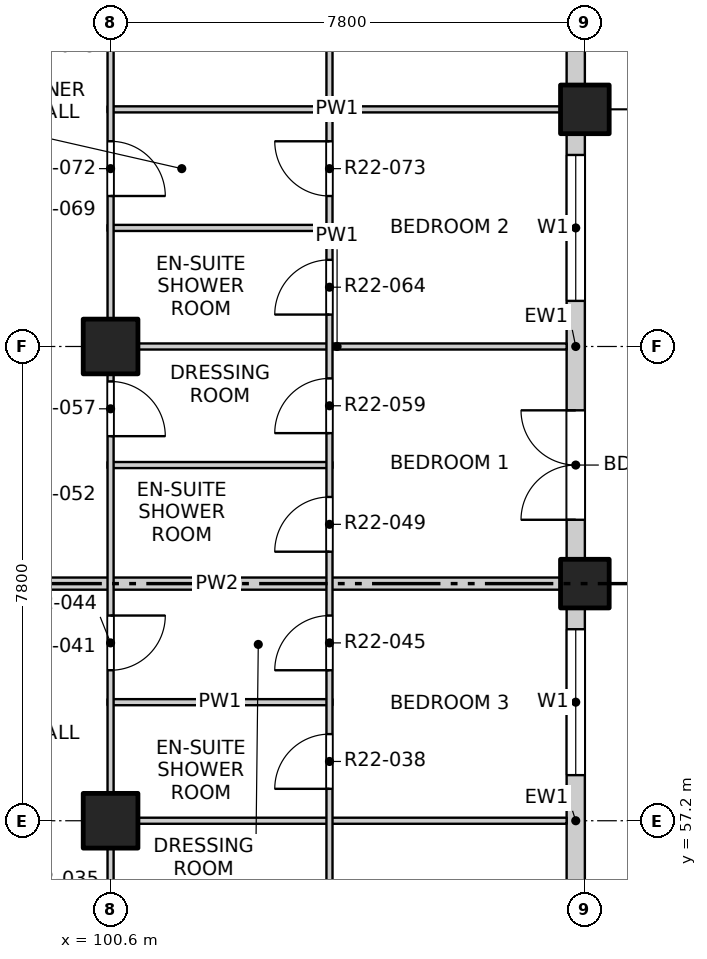
"""IFC4 building model, lengths in metres.
Left out: names, types, materials, properties, quantities, classifications, styles, units other than length and angle.
Written with IfcOpenShell. Run it as: python <this file> out.ifc"""

import sys

from ifc_helpers import new_model, si_unit, direction, frame, frame_2d, origin, origin_2d, place, context, subcontext, project, spatial, rectangle, extrude, element, fill, save


model = new_model("IFC4")
c1 = context("Model", 3, precision=1e-05, world=origin(), true_north=direction((0.0, 1.0)))
c2 = subcontext(c1, "Body", "Model", "MODEL_VIEW")
j1 = project(units=[si_unit("LENGTHUNIT", "METRE"), si_unit("PLANEANGLEUNIT", "RADIAN")], contexts=[c1])
p1 = place(None, origin())
s1 = spatial("IfcSite", under=j1, at=p1, CompositionType="ELEMENT")
p2 = place(p1, origin())
s2 = spatial("IfcBuilding", under=s1, at=p2, CompositionType="ELEMENT")
p3 = place(p2, frame((0.0, 0.0, 224.5)))
s3 = spatial("IfcBuildingStorey", under=s2, at=p3, CompositionType="ELEMENT", Elevation=224.5)
for number, where, z_axis, x_axis in (
    (1, (108.4, 61.1, -0.25), (0.0, 0.0, 1.0), (1.0, 0.0, 0.0)),
    (2, (108.4, 68.9, -0.25), (0.0, 0.0, 1.0), (1.0, 0.0, 0.0)),
):
    element("IfcColumn", number, at=place(p3, frame(where, z_axis=z_axis, x_axis=x_axis)), inside=s3, PredefinedType="COLUMN", context=c2, shape_type="SweptSolid", body=[
        extrude(rectangle(XDim=0.8, YDim=0.8, at=origin_2d()), origin(), (0.0, 0.0, 1.0), 3.4),
    ])
for number, where, z_axis, x_axis in (
    (3, (100.6, 57.2, -0.25), (0.0, 0.0, 1.0), (1.0, 0.0, 0.0)),
    (4, (100.6, 65.0, -0.25), (0.0, 0.0, 1.0), (1.0, 0.0, 0.0)),
):
    element("IfcColumn", number, at=place(p3, frame(where, z_axis=z_axis, x_axis=x_axis)), inside=s3, PredefinedType="COLUMN", context=c2, shape_type="SweptSolid", body=[
        extrude(rectangle(XDim=0.9, YDim=0.9, at=origin_2d()), origin(), (0.0, 0.0, 1.0), 3.4),
    ])
p4 = place(p3, frame((108.25, 53.7, 0.0), z_axis=(0.0, 0.0, 1.0), x_axis=(0.0, 1.0, 0.0)))
e5 = element("IfcWall", 5, at=p4, inside=s3, PredefinedType="SOLIDWALL", context=c2, shape_type="SweptSolid", body=[
    extrude(rectangle(XDim=7.0, YDim=0.3, at=frame_2d((3.5, 0.0))), origin(), (0.0, 0.0, 1.0), 2.7),
])
p5 = place(p4, frame((0.65, 0.0, 0.0)))
e6 = element("IfcOpeningElement", 6, at=p5, cuts=e5, PredefinedType="OPENING", context=c2, shape_type="SweptSolid", body=[
    extrude(rectangle(XDim=1.8, YDim=2.4, at=frame_2d((0.9, 1.2))), frame((0.0, 0.16, 0.0), z_axis=(0.0, -1.0, 0.0), x_axis=(1.0, 0.0, 0.0)), (0.0, 0.0, 1.0), 0.32),
])
p6 = place(p4, frame((4.25, 0.0, 0.9)))
e7 = element("IfcOpeningElement", 7, at=p6, cuts=e5, PredefinedType="OPENING", context=c2, shape_type="SweptSolid", body=[
    extrude(rectangle(XDim=2.4, YDim=1.8, at=frame_2d((1.2, 0.9))), frame((0.0, 0.16, 0.0), z_axis=(0.0, -1.0, 0.0), x_axis=(1.0, 0.0, 0.0)), (0.0, 0.0, 1.0), 0.32),
])
p7 = place(p3, frame((108.25, 61.5, 0.0), z_axis=(0.0, 0.0, 1.0), x_axis=(0.0, 1.0, 0.0)))
e8 = element("IfcWall", 8, at=p7, inside=s3, PredefinedType="SOLIDWALL", context=c2, shape_type="SweptSolid", body=[
    extrude(rectangle(XDim=7.0, YDim=0.3, at=frame_2d((3.5, 0.0))), origin(), (0.0, 0.0, 1.0), 2.7),
])
p8 = place(p7, frame((0.65, 0.0, 0.0)))
e9 = element("IfcOpeningElement", 9, at=p8, cuts=e8, PredefinedType="OPENING", context=c2, shape_type="SweptSolid", body=[
    extrude(rectangle(XDim=1.8, YDim=2.4, at=frame_2d((0.9, 1.2))), frame((0.0, 0.16, 0.0), z_axis=(0.0, -1.0, 0.0), x_axis=(1.0, 0.0, 0.0)), (0.0, 0.0, 1.0), 0.32),
])
p9 = place(p7, frame((4.25, 0.0, 0.9)))
e10 = element("IfcOpeningElement", 10, at=p9, cuts=e8, PredefinedType="OPENING", context=c2, shape_type="SweptSolid", body=[
    extrude(rectangle(XDim=2.4, YDim=1.8, at=frame_2d((1.2, 0.9))), frame((0.0, 0.16, 0.0), z_axis=(0.0, -1.0, 0.0), x_axis=(1.0, 0.0, 0.0)), (0.0, 0.0, 1.0), 0.32),
])
p10 = place(p3, frame((108.25, 69.3, 0.0), z_axis=(0.0, 0.0, 1.0), x_axis=(0.0, 1.0, 0.0)))
e11 = element("IfcWall", 11, at=p10, inside=s3, PredefinedType="SOLIDWALL", context=c2, shape_type="SweptSolid", body=[
    extrude(rectangle(XDim=7.0, YDim=0.3, at=frame_2d((3.5, 0.0))), origin(), (0.0, 0.0, 1.0), 2.7),
])
p11 = place(p10, frame((0.65, 0.0, 0.0)))
e12 = element("IfcOpeningElement", 12, at=p11, cuts=e11, PredefinedType="OPENING", context=c2, shape_type="SweptSolid", body=[
    extrude(rectangle(XDim=1.8, YDim=2.4, at=frame_2d((0.9, 1.2))), frame((0.0, 0.16, 0.0), z_axis=(0.0, -1.0, 0.0), x_axis=(1.0, 0.0, 0.0)), (0.0, 0.0, 1.0), 0.32),
])
p12 = place(p10, frame((4.25, 0.0, 0.9)))
e13 = element("IfcOpeningElement", 13, at=p12, cuts=e11, PredefinedType="OPENING", context=c2, shape_type="SweptSolid", body=[
    extrude(rectangle(XDim=2.4, YDim=1.8, at=frame_2d((1.2, 0.9))), frame((0.0, 0.16, 0.0), z_axis=(0.0, -1.0, 0.0), x_axis=(1.0, 0.0, 0.0)), (0.0, 0.0, 1.0), 0.32),
])
p13 = place(p3, frame((100.55, 57.2, 0.0), z_axis=(0.0, 0.0, 1.0), x_axis=(1.0, 0.0, 0.0)))
e14 = element("IfcWall", 14, at=p13, inside=s3, PredefinedType="PARTITIONING", context=c2, shape_type="SweptSolid", body=[
    extrude(rectangle(XDim=7.55, YDim=0.1, at=frame_2d((3.775, 0.0))), origin(), (0.0, 0.0, 1.0), 3.15),
])
p14 = place(p3, frame((100.55, 59.15, 0.0), z_axis=(0.0, 0.0, 1.0), x_axis=(1.0, 0.0, 0.0)))
e15 = element("IfcWall", 15, at=p14, inside=s3, PredefinedType="PARTITIONING", context=c2, shape_type="SweptSolid", body=[
    extrude(rectangle(XDim=3.7, YDim=0.1, at=frame_2d((1.85, 0.0))), origin(), (0.0, 0.0, 1.0), 3.15),
])
p15 = place(p3, frame((96.6, 61.1, 0.0), z_axis=(0.0, 0.0, 1.0), x_axis=(1.0, 0.0, 0.0)))
e16 = element("IfcWall", 16, at=p15, inside=s3, PredefinedType="PARTITIONING", context=c2, shape_type="SweptSolid", body=[
    extrude(rectangle(XDim=11.5, YDim=0.2, at=frame_2d((5.75, 0.0))), origin(), (0.0, 0.0, 1.0), 2.55),
])
p16 = place(p3, frame((100.55, 63.05, 0.0), z_axis=(0.0, 0.0, 1.0), x_axis=(1.0, 0.0, 0.0)))
e17 = element("IfcWall", 17, at=p16, inside=s3, PredefinedType="PARTITIONING", context=c2, shape_type="SweptSolid", body=[
    extrude(rectangle(XDim=3.7, YDim=0.1, at=frame_2d((1.85, 0.0))), origin(), (0.0, 0.0, 1.0), 3.15),
])
p17 = place(p3, frame((100.55, 65.0, 0.0), z_axis=(0.0, 0.0, 1.0), x_axis=(1.0, 0.0, 0.0)))
e18 = element("IfcWall", 18, at=p17, inside=s3, PredefinedType="PARTITIONING", context=c2, shape_type="SweptSolid", body=[
    extrude(rectangle(XDim=7.55, YDim=0.1, at=frame_2d((3.775, 0.0))), origin(), (0.0, 0.0, 1.0), 3.15),
])
p18 = place(p3, frame((100.55, 66.95, 0.0), z_axis=(0.0, 0.0, 1.0), x_axis=(1.0, 0.0, 0.0)))
e19 = element("IfcWall", 19, at=p18, inside=s3, PredefinedType="PARTITIONING", context=c2, shape_type="SweptSolid", body=[
    extrude(rectangle(XDim=3.7, YDim=0.1, at=frame_2d((1.85, 0.0))), origin(), (0.0, 0.0, 1.0), 3.15),
])
p19 = place(p3, frame((100.55, 68.9, 0.0), z_axis=(0.0, 0.0, 1.0), x_axis=(1.0, 0.0, 0.0)))
e20 = element("IfcWall", 20, at=p19, inside=s3, PredefinedType="PARTITIONING", context=c2, shape_type="SweptSolid", body=[
    extrude(rectangle(XDim=7.55, YDim=0.1, at=frame_2d((3.775, 0.0))), origin(), (0.0, 0.0, 1.0), 2.55),
])
p20 = place(p3, frame((100.6, 41.9, 0.0), z_axis=(0.0, 0.0, 1.0), x_axis=(0.0, 1.0, 0.0)))
e21 = element("IfcWall", 21, at=p20, inside=s3, PredefinedType="PARTITIONING", context=c2, shape_type="SweptSolid", body=[
    extrude(rectangle(XDim=46.2, YDim=0.1, at=frame_2d((23.1, 0.0))), origin(), (0.0, 0.0, 1.0), 3.15),
])
p21 = place(p20, frame((1.2, 0.0, 0.0)))
e22 = element("IfcOpeningElement", 22, at=p21, cuts=e21, PredefinedType="OPENING", context=c2, shape_type="SweptSolid", body=[
    extrude(rectangle(XDim=0.9, YDim=2.1, at=frame_2d((0.45, 1.05))), frame((0.0, 0.06, 0.0), z_axis=(0.0, -1.0, 0.0), x_axis=(1.0, 0.0, 0.0)), (0.0, 0.0, 1.0), 0.12),
])
p22 = place(p20, frame((6.025, 0.0, 0.0)))
e23 = element("IfcOpeningElement", 23, at=p22, cuts=e21, PredefinedType="OPENING", context=c2, shape_type="SweptSolid", body=[
    extrude(rectangle(XDim=0.9, YDim=2.1, at=frame_2d((0.45, 1.05))), frame((0.0, 0.06, 0.0), z_axis=(0.0, -1.0, 0.0), x_axis=(1.0, 0.0, 0.0)), (0.0, 0.0, 1.0), 0.12),
])
p23 = place(p20, frame((9.0, 0.0, 0.0)))
e24 = element("IfcOpeningElement", 24, at=p23, cuts=e21, PredefinedType="OPENING", context=c2, shape_type="SweptSolid", body=[
    extrude(rectangle(XDim=0.9, YDim=2.1, at=frame_2d((0.45, 1.05))), frame((0.0, 0.06, 0.0), z_axis=(0.0, -1.0, 0.0), x_axis=(1.0, 0.0, 0.0)), (0.0, 0.0, 1.0), 0.12),
])
p24 = place(p20, frame((12.9, 0.0, 0.0)))
e25 = element("IfcOpeningElement", 25, at=p24, cuts=e21, PredefinedType="OPENING", context=c2, shape_type="SweptSolid", body=[
    extrude(rectangle(XDim=0.9, YDim=2.1, at=frame_2d((0.45, 1.05))), frame((0.0, 0.06, 0.0), z_axis=(0.0, -1.0, 0.0), x_axis=(1.0, 0.0, 0.0)), (0.0, 0.0, 1.0), 0.12),
])
p25 = place(p20, frame((17.775, 0.0, 0.0)))
e26 = element("IfcOpeningElement", 26, at=p25, cuts=e21, PredefinedType="OPENING", context=c2, shape_type="SweptSolid", body=[
    extrude(rectangle(XDim=0.9, YDim=2.1, at=frame_2d((0.45, 1.05))), frame((0.0, 0.06, 0.0), z_axis=(0.0, -1.0, 0.0), x_axis=(1.0, 0.0, 0.0)), (0.0, 0.0, 1.0), 0.12),
])
p26 = place(p20, frame((21.625, 0.0, 0.0)))
e27 = element("IfcOpeningElement", 27, at=p26, cuts=e21, PredefinedType="OPENING", context=c2, shape_type="SweptSolid", body=[
    extrude(rectangle(XDim=0.9, YDim=2.1, at=frame_2d((0.45, 1.05))), frame((0.0, 0.06, 0.0), z_axis=(0.0, -1.0, 0.0), x_axis=(1.0, 0.0, 0.0)), (0.0, 0.0, 1.0), 0.12),
])
p27 = place(p20, frame((25.575, 0.0, 0.0)))
e28 = element("IfcOpeningElement", 28, at=p27, cuts=e21, PredefinedType="OPENING", context=c2, shape_type="SweptSolid", body=[
    extrude(rectangle(XDim=0.9, YDim=2.1, at=frame_2d((0.45, 1.05))), frame((0.0, 0.06, 0.0), z_axis=(0.0, -1.0, 0.0), x_axis=(1.0, 0.0, 0.0)), (0.0, 0.0, 1.0), 0.12),
])
p28 = place(p20, frame((28.5, 0.0, 0.0)))
e29 = element("IfcOpeningElement", 29, at=p28, cuts=e21, PredefinedType="OPENING", context=c2, shape_type="SweptSolid", body=[
    extrude(rectangle(XDim=0.9, YDim=2.1, at=frame_2d((0.45, 1.05))), frame((0.0, 0.06, 0.0), z_axis=(0.0, -1.0, 0.0), x_axis=(1.0, 0.0, 0.0)), (0.0, 0.0, 1.0), 0.12),
])
p29 = place(p20, frame((33.375, 0.0, 0.0)))
e30 = element("IfcOpeningElement", 30, at=p29, cuts=e21, PredefinedType="OPENING", context=c2, shape_type="SweptSolid", body=[
    extrude(rectangle(XDim=0.9, YDim=2.1, at=frame_2d((0.45, 1.05))), frame((0.0, 0.06, 0.0), z_axis=(0.0, -1.0, 0.0), x_axis=(1.0, 0.0, 0.0)), (0.0, 0.0, 1.0), 0.12),
])
p30 = place(p20, frame((36.3, 0.0, 0.0)))
e31 = element("IfcOpeningElement", 31, at=p30, cuts=e21, PredefinedType="OPENING", context=c2, shape_type="SweptSolid", body=[
    extrude(rectangle(XDim=0.9, YDim=2.1, at=frame_2d((0.45, 1.05))), frame((0.0, 0.06, 0.0), z_axis=(0.0, -1.0, 0.0), x_axis=(1.0, 0.0, 0.0)), (0.0, 0.0, 1.0), 0.12),
])
p31 = place(p20, frame((40.2, 0.0, 0.0)))
e32 = element("IfcOpeningElement", 32, at=p31, cuts=e21, PredefinedType="OPENING", context=c2, shape_type="SweptSolid", body=[
    extrude(rectangle(XDim=0.9, YDim=2.1, at=frame_2d((0.45, 1.05))), frame((0.0, 0.06, 0.0), z_axis=(0.0, -1.0, 0.0), x_axis=(1.0, 0.0, 0.0)), (0.0, 0.0, 1.0), 0.12),
])
p32 = place(p20, frame((44.1, 0.0, 0.0)))
e33 = element("IfcOpeningElement", 33, at=p32, cuts=e21, PredefinedType="OPENING", context=c2, shape_type="SweptSolid", body=[
    extrude(rectangle(XDim=0.9, YDim=2.1, at=frame_2d((0.45, 1.05))), frame((0.0, 0.06, 0.0), z_axis=(0.0, -1.0, 0.0), x_axis=(1.0, 0.0, 0.0)), (0.0, 0.0, 1.0), 0.12),
])
p33 = place(p3, frame((104.2, 41.9, 0.0), z_axis=(0.0, 0.0, 1.0), x_axis=(0.0, 1.0, 0.0)))
e34 = element("IfcWall", 34, at=p33, inside=s3, PredefinedType="PARTITIONING", context=c2, shape_type="SweptSolid", body=[
    extrude(rectangle(XDim=34.7, YDim=0.1, at=frame_2d((17.35, 0.0))), origin(), (0.0, 0.0, 1.0), 3.15),
])
p34 = place(p33, frame((1.05, 0.0, 0.0)))
e35 = element("IfcOpeningElement", 35, at=p34, cuts=e34, PredefinedType="OPENING", context=c2, shape_type="SweptSolid", body=[
    extrude(rectangle(XDim=1.2, YDim=2.1, at=frame_2d((0.6, 1.05))), frame((0.0, 0.06, 0.0), z_axis=(0.0, -1.0, 0.0), x_axis=(1.0, 0.0, 0.0)), (0.0, 0.0, 1.0), 0.12),
])
p35 = place(p33, frame((4.125, 0.0, 0.0)))
e36 = element("IfcOpeningElement", 36, at=p35, cuts=e34, PredefinedType="OPENING", context=c2, shape_type="SweptSolid", body=[
    extrude(rectangle(XDim=0.9, YDim=2.1, at=frame_2d((0.45, 1.05))), frame((0.0, 0.06, 0.0), z_axis=(0.0, -1.0, 0.0), x_axis=(1.0, 0.0, 0.0)), (0.0, 0.0, 1.0), 0.12),
])
p36 = place(p33, frame((6.075, 0.0, 0.0)))
e37 = element("IfcOpeningElement", 37, at=p36, cuts=e34, PredefinedType="OPENING", context=c2, shape_type="SweptSolid", body=[
    extrude(rectangle(XDim=0.9, YDim=2.1, at=frame_2d((0.45, 1.05))), frame((0.0, 0.06, 0.0), z_axis=(0.0, -1.0, 0.0), x_axis=(1.0, 0.0, 0.0)), (0.0, 0.0, 1.0), 0.12),
])
p37 = place(p33, frame((8.85, 0.0, 0.0)))
e38 = element("IfcOpeningElement", 38, at=p37, cuts=e34, PredefinedType="OPENING", context=c2, shape_type="SweptSolid", body=[
    extrude(rectangle(XDim=1.2, YDim=2.1, at=frame_2d((0.6, 1.05))), frame((0.0, 0.06, 0.0), z_axis=(0.0, -1.0, 0.0), x_axis=(1.0, 0.0, 0.0)), (0.0, 0.0, 1.0), 0.12),
])
p38 = place(p33, frame((12.75, 0.0, 0.0)))
e39 = element("IfcOpeningElement", 39, at=p38, cuts=e34, PredefinedType="OPENING", context=c2, shape_type="SweptSolid", body=[
    extrude(rectangle(XDim=1.2, YDim=2.1, at=frame_2d((0.6, 1.05))), frame((0.0, 0.06, 0.0), z_axis=(0.0, -1.0, 0.0), x_axis=(1.0, 0.0, 0.0)), (0.0, 0.0, 1.0), 0.12),
])
p39 = place(p33, frame((15.825, 0.0, 0.0)))
e40 = element("IfcOpeningElement", 40, at=p39, cuts=e34, PredefinedType="OPENING", context=c2, shape_type="SweptSolid", body=[
    extrude(rectangle(XDim=0.9, YDim=2.1, at=frame_2d((0.45, 1.05))), frame((0.0, 0.06, 0.0), z_axis=(0.0, -1.0, 0.0), x_axis=(1.0, 0.0, 0.0)), (0.0, 0.0, 1.0), 0.12),
])
p40 = place(p33, frame((17.775, 0.0, 0.0)))
e41 = element("IfcOpeningElement", 41, at=p40, cuts=e34, PredefinedType="OPENING", context=c2, shape_type="SweptSolid", body=[
    extrude(rectangle(XDim=0.9, YDim=2.1, at=frame_2d((0.45, 1.05))), frame((0.0, 0.06, 0.0), z_axis=(0.0, -1.0, 0.0), x_axis=(1.0, 0.0, 0.0)), (0.0, 0.0, 1.0), 0.12),
])
p41 = place(p33, frame((19.725, 0.0, 0.0)))
e42 = element("IfcOpeningElement", 42, at=p41, cuts=e34, PredefinedType="OPENING", context=c2, shape_type="SweptSolid", body=[
    extrude(rectangle(XDim=0.9, YDim=2.1, at=frame_2d((0.45, 1.05))), frame((0.0, 0.06, 0.0), z_axis=(0.0, -1.0, 0.0), x_axis=(1.0, 0.0, 0.0)), (0.0, 0.0, 1.0), 0.12),
])
p42 = place(p33, frame((21.675, 0.0, 0.0)))
e43 = element("IfcOpeningElement", 43, at=p42, cuts=e34, PredefinedType="OPENING", context=c2, shape_type="SweptSolid", body=[
    extrude(rectangle(XDim=0.9, YDim=2.1, at=frame_2d((0.45, 1.05))), frame((0.0, 0.06, 0.0), z_axis=(0.0, -1.0, 0.0), x_axis=(1.0, 0.0, 0.0)), (0.0, 0.0, 1.0), 0.12),
])
p43 = place(p33, frame((23.625, 0.0, 0.0)))
e44 = element("IfcOpeningElement", 44, at=p43, cuts=e34, PredefinedType="OPENING", context=c2, shape_type="SweptSolid", body=[
    extrude(rectangle(XDim=0.9, YDim=2.1, at=frame_2d((0.45, 1.05))), frame((0.0, 0.06, 0.0), z_axis=(0.0, -1.0, 0.0), x_axis=(1.0, 0.0, 0.0)), (0.0, 0.0, 1.0), 0.12),
])
p44 = place(p33, frame((25.575, 0.0, 0.0)))
e45 = element("IfcOpeningElement", 45, at=p44, cuts=e34, PredefinedType="OPENING", context=c2, shape_type="SweptSolid", body=[
    extrude(rectangle(XDim=0.9, YDim=2.1, at=frame_2d((0.45, 1.05))), frame((0.0, 0.06, 0.0), z_axis=(0.0, -1.0, 0.0), x_axis=(1.0, 0.0, 0.0)), (0.0, 0.0, 1.0), 0.12),
])
p45 = place(p33, frame((28.35, 0.0, 0.0)))
e46 = element("IfcOpeningElement", 46, at=p45, cuts=e34, PredefinedType="OPENING", context=c2, shape_type="SweptSolid", body=[
    extrude(rectangle(XDim=1.2, YDim=2.1, at=frame_2d((0.6, 1.05))), frame((0.0, 0.06, 0.0), z_axis=(0.0, -1.0, 0.0), x_axis=(1.0, 0.0, 0.0)), (0.0, 0.0, 1.0), 0.12),
])
p46 = place(p33, frame((31.425, 0.0, 0.0)))
e47 = element("IfcOpeningElement", 47, at=p46, cuts=e34, PredefinedType="OPENING", context=c2, shape_type="SweptSolid", body=[
    extrude(rectangle(XDim=0.9, YDim=2.1, at=frame_2d((0.45, 1.05))), frame((0.0, 0.06, 0.0), z_axis=(0.0, -1.0, 0.0), x_axis=(1.0, 0.0, 0.0)), (0.0, 0.0, 1.0), 0.12),
])
p47 = place(p33, frame((33.375, 0.0, 0.0)))
e48 = element("IfcOpeningElement", 48, at=p47, cuts=e34, PredefinedType="OPENING", context=c2, shape_type="SweptSolid", body=[
    extrude(rectangle(XDim=0.9, YDim=2.1, at=frame_2d((0.45, 1.05))), frame((0.0, 0.06, 0.0), z_axis=(0.0, -1.0, 0.0), x_axis=(1.0, 0.0, 0.0)), (0.0, 0.0, 1.0), 0.12),
])
p48 = place(p6, origin())
e49 = element("IfcWindow", 49, at=p48, inside=s3, PartitioningType="DOUBLE_PANEL_VERTICAL", PredefinedType="WINDOW", context=c2, shape_type="SweptSolid", body=[
    extrude(rectangle(XDim=2.4, YDim=1.8, at=frame_2d((1.2, 0.9))), frame((0.0, 0.03, 0.0), z_axis=(0.0, -1.0, 0.0), x_axis=(1.0, 0.0, 0.0)), (0.0, 0.0, 1.0), 0.06),
])
fill(e7, e49)
p49 = place(p8, origin())
e50 = element("IfcDoor", 50, at=p49, inside=s3, OperationType="DOUBLE_DOOR_SINGLE_SWING", PredefinedType="DOOR", context=c2, shape_type="SweptSolid", body=[
    extrude(rectangle(XDim=1.8, YDim=2.4, at=frame_2d((0.9, 1.2))), frame((0.0, 0.025, 0.0), z_axis=(0.0, -1.0, 0.0), x_axis=(1.0, 0.0, 0.0)), (0.0, 0.0, 1.0), 0.05),
])
fill(e9, e50)
p50 = place(p9, origin())
e51 = element("IfcWindow", 51, at=p50, inside=s3, PartitioningType="DOUBLE_PANEL_VERTICAL", PredefinedType="WINDOW", context=c2, shape_type="SweptSolid", body=[
    extrude(rectangle(XDim=2.4, YDim=1.8, at=frame_2d((1.2, 0.9))), frame((0.0, 0.03, 0.0), z_axis=(0.0, -1.0, 0.0), x_axis=(1.0, 0.0, 0.0)), (0.0, 0.0, 1.0), 0.06),
])
fill(e10, e51)
p51 = place(p39, origin())
e52 = element("IfcDoor", 52, at=p51, inside=s3, OperationType="SINGLE_SWING_LEFT", PredefinedType="DOOR", context=c2, shape_type="SweptSolid", body=[
    extrude(rectangle(XDim=0.9, YDim=2.1, at=frame_2d((0.45, 1.05))), frame((0.0, 0.025, 0.0), z_axis=(0.0, -1.0, 0.0), x_axis=(1.0, 0.0, 0.0)), (0.0, 0.0, 1.0), 0.05),
])
fill(e40, e52)
p52 = place(p25, origin())
e53 = element("IfcDoor", 53, at=p52, inside=s3, OperationType="SINGLE_SWING_LEFT", PredefinedType="DOOR", context=c2, shape_type="SweptSolid", body=[
    extrude(rectangle(XDim=0.9, YDim=2.1, at=frame_2d((0.45, 1.05))), frame((0.0, 0.025, 0.0), z_axis=(0.0, -1.0, 0.0), x_axis=(1.0, 0.0, 0.0)), (0.0, 0.0, 1.0), 0.05),
])
fill(e26, e53)
p53 = place(p40, origin())
e54 = element("IfcDoor", 54, at=p53, inside=s3, OperationType="SINGLE_SWING_LEFT", PredefinedType="DOOR", context=c2, shape_type="SweptSolid", body=[
    extrude(rectangle(XDim=0.9, YDim=2.1, at=frame_2d((0.45, 1.05))), frame((0.0, 0.025, 0.0), z_axis=(0.0, -1.0, 0.0), x_axis=(1.0, 0.0, 0.0)), (0.0, 0.0, 1.0), 0.05),
])
fill(e41, e54)
p54 = place(p41, origin())
e55 = element("IfcDoor", 55, at=p54, inside=s3, OperationType="SINGLE_SWING_LEFT", PredefinedType="DOOR", context=c2, shape_type="SweptSolid", body=[
    extrude(rectangle(XDim=0.9, YDim=2.1, at=frame_2d((0.45, 1.05))), frame((0.0, 0.025, 0.0), z_axis=(0.0, -1.0, 0.0), x_axis=(1.0, 0.0, 0.0)), (0.0, 0.0, 1.0), 0.05),
])
fill(e42, e55)
p55 = place(p26, origin())
e56 = element("IfcDoor", 56, at=p55, inside=s3, OperationType="SINGLE_SWING_RIGHT", PredefinedType="DOOR", context=c2, shape_type="SweptSolid", body=[
    extrude(rectangle(XDim=0.9, YDim=2.1, at=frame_2d((0.45, 1.05))), frame((0.0, 0.025, 0.0), z_axis=(0.0, -1.0, 0.0), x_axis=(1.0, 0.0, 0.0)), (0.0, 0.0, 1.0), 0.05),
])
fill(e27, e56)
p56 = place(p42, origin())
e57 = element("IfcDoor", 57, at=p56, inside=s3, OperationType="SINGLE_SWING_LEFT", PredefinedType="DOOR", context=c2, shape_type="SweptSolid", body=[
    extrude(rectangle(XDim=0.9, YDim=2.1, at=frame_2d((0.45, 1.05))), frame((0.0, 0.025, 0.0), z_axis=(0.0, -1.0, 0.0), x_axis=(1.0, 0.0, 0.0)), (0.0, 0.0, 1.0), 0.05),
])
fill(e43, e57)
p57 = place(p43, origin())
e58 = element("IfcDoor", 58, at=p57, inside=s3, OperationType="SINGLE_SWING_LEFT", PredefinedType="DOOR", context=c2, shape_type="SweptSolid", body=[
    extrude(rectangle(XDim=0.9, YDim=2.1, at=frame_2d((0.45, 1.05))), frame((0.0, 0.025, 0.0), z_axis=(0.0, -1.0, 0.0), x_axis=(1.0, 0.0, 0.0)), (0.0, 0.0, 1.0), 0.05),
])
fill(e44, e58)
p58 = place(p27, origin())
e59 = element("IfcDoor", 59, at=p58, inside=s3, OperationType="SINGLE_SWING_RIGHT", PredefinedType="DOOR", context=c2, shape_type="SweptSolid", body=[
    extrude(rectangle(XDim=0.9, YDim=2.1, at=frame_2d((0.45, 1.05))), frame((0.0, 0.025, 0.0), z_axis=(0.0, -1.0, 0.0), x_axis=(1.0, 0.0, 0.0)), (0.0, 0.0, 1.0), 0.05),
])
fill(e28, e59)
p59 = place(p44, origin())
e60 = element("IfcDoor", 60, at=p59, inside=s3, OperationType="SINGLE_SWING_RIGHT", PredefinedType="DOOR", context=c2, shape_type="SweptSolid", body=[
    extrude(rectangle(XDim=0.9, YDim=2.1, at=frame_2d((0.45, 1.05))), frame((0.0, 0.025, 0.0), z_axis=(0.0, -1.0, 0.0), x_axis=(1.0, 0.0, 0.0)), (0.0, 0.0, 1.0), 0.05),
])
fill(e45, e60)
save(model, sys.argv[1])
